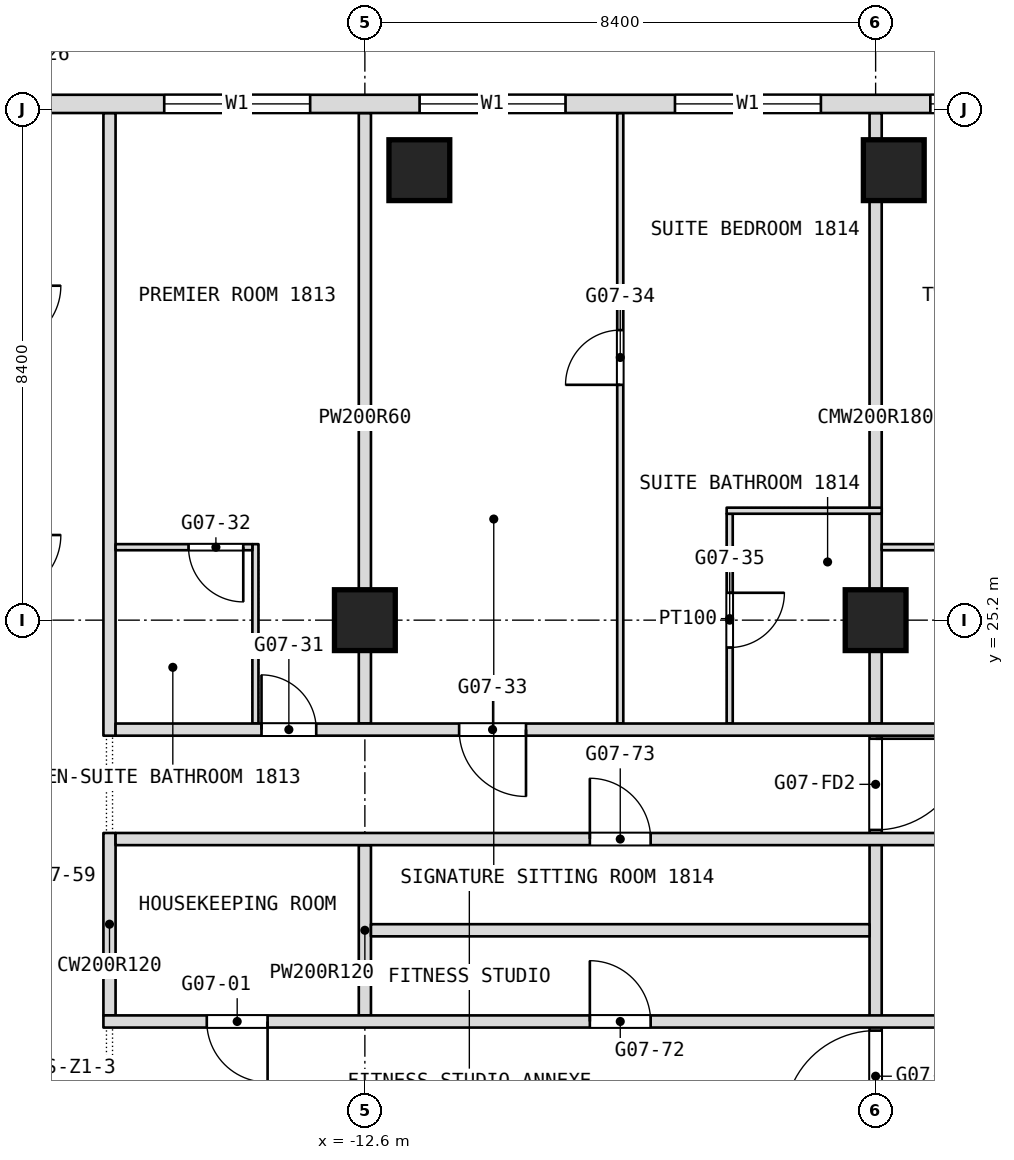
"""IFC4 building model, lengths in metres.
Left out: names, types, materials, properties, quantities, classifications, styles, units other than length and angle.
Written with IfcOpenShell. Run it as: python <this file> out.ifc"""

import sys

from ifc_helpers import new_model, si_unit, direction, frame, frame_2d, origin, origin_2d, place, context, subcontext, project, spatial, rectangle, extrude, element, fill, save


model = new_model("IFC4")
c1 = context("Model", 3, precision=1e-05, world=origin(), true_north=direction((0.0, 1.0)))
c2 = subcontext(c1, "Body", "Model", "MODEL_VIEW")
j1 = project(units=[si_unit("LENGTHUNIT", "METRE"), si_unit("PLANEANGLEUNIT", "RADIAN")], contexts=[c1])
p1 = place(None, origin())
s1 = spatial("IfcSite", under=j1, at=p1, CompositionType="ELEMENT")
p2 = place(p1, origin())
s2 = spatial("IfcBuilding", under=s1, at=p2, CompositionType="ELEMENT")
p3 = place(p2, frame((0.0, 0.0, 79.7)))
s3 = spatial("IfcBuildingStorey", under=s2, at=p3, CompositionType="ELEMENT", Elevation=79.7)
for number, where, z_axis, x_axis in (
    (1, (-12.6, 25.2, 0.0), (0.0, 0.0, 1.0), (1.0, 0.0, 0.0)),
    (2, (-4.2, 25.2, 0.0), (0.0, 0.0, 1.0), (1.0, 0.0, 0.0)),
    (3, (-11.704, 32.6, 0.0), (0.0, 0.0, 1.0), (1.0, 0.0, 0.0)),
    (4, (-3.901, 32.6, 0.0), (0.0, 0.0, 1.0), (1.0, 0.0, 0.0)),
):
    element("IfcColumn", number, at=place(p3, frame(where, z_axis=z_axis, x_axis=x_axis)), inside=s3, PredefinedType="COLUMN", context=c2, shape_type="SweptSolid", body=[
        extrude(rectangle(XDim=1.0, YDim=1.0, at=origin_2d()), origin(), (0.0, 0.0, 1.0), 3.6),
    ])
p4 = place(p3, frame((-4.2, 16.8, 0.0), z_axis=(0.0, 0.0, 1.0), x_axis=(0.0, 1.0, 0.0)))
e5 = element("IfcWall", 5, at=p4, inside=s3, PredefinedType="PARTITIONING", context=c2, shape_type="SweptSolid", body=[
    extrude(rectangle(XDim=6.7, YDim=0.2, at=frame_2d((3.35, 0.0))), origin(), (0.0, 0.0, 1.0), 3.34),
])
p5 = place(p4, frame((0.15, 0.0, 0.0)))
e6 = element("IfcOpeningElement", 6, at=p5, cuts=e5, PredefinedType="OPENING", context=c2, shape_type="SweptSolid", body=[
    extrude(rectangle(XDim=1.5, YDim=2.1, at=frame_2d((0.75, 1.05))), frame((0.0, 0.1, 0.0), z_axis=(0.0, -1.0, 0.0), x_axis=(1.0, 0.0, 0.0)), (0.0, 0.0, 1.0), 0.2),
])
p6 = place(p4, frame((4.95, 0.0, 0.0)))
e7 = element("IfcOpeningElement", 7, at=p6, cuts=e5, PredefinedType="OPENING", context=c2, shape_type="SweptSolid", body=[
    extrude(rectangle(XDim=1.5, YDim=2.1, at=frame_2d((0.75, 1.05))), frame((0.0, 0.1, 0.0), z_axis=(0.0, -1.0, 0.0), x_axis=(1.0, 0.0, 0.0)), (0.0, 0.0, 1.0), 0.2),
])
p7 = place(p3, frame((-4.2, 23.5, 0.0), z_axis=(0.0, 0.0, 1.0), x_axis=(0.0, 1.0, 0.0)))
e8 = element("IfcWall", 8, at=p7, inside=s3, PredefinedType="PARTITIONING", context=c2, shape_type="SweptSolid", body=[
    extrude(rectangle(XDim=10.04, YDim=0.2, at=frame_2d((5.02, 0.0))), origin(), (0.0, 0.0, 1.0), 3.34),
])
p8 = place(p3, frame((-6.6, 23.5, 0.0), z_axis=(0.0, 0.0, 1.0), x_axis=(0.0, 1.0, 0.0)))
e9 = element("IfcWall", 9, at=p8, inside=s3, PredefinedType="PARTITIONING", context=c2, shape_type="SweptSolid", body=[
    extrude(rectangle(XDim=3.45, YDim=0.1, at=frame_2d((1.725, 0.0))), origin(), (0.0, 0.0, 1.0), 3.34),
])
p9 = place(p8, frame((1.25, 0.0, 0.0)))
e10 = element("IfcOpeningElement", 10, at=p9, cuts=e9, PredefinedType="OPENING", context=c2, shape_type="SweptSolid", body=[
    extrude(rectangle(XDim=0.9, YDim=2.1, at=frame_2d((0.45, 1.05))), frame((0.0, 0.05, 0.0), z_axis=(0.0, -1.0, 0.0), x_axis=(1.0, 0.0, 0.0)), (0.0, 0.0, 1.0), 0.1),
])
p10 = place(p3, frame((-8.4, 23.5, 0.0), z_axis=(0.0, 0.0, 1.0), x_axis=(0.0, 1.0, 0.0)))
e11 = element("IfcWall", 11, at=p10, inside=s3, PredefinedType="PARTITIONING", context=c2, shape_type="SweptSolid", body=[
    extrude(rectangle(XDim=10.04, YDim=0.1, at=frame_2d((5.02, 0.0))), origin(), (0.0, 0.0, 1.0), 3.34),
])
p11 = place(p10, frame((5.57, 0.0, 0.0)))
e12 = element("IfcOpeningElement", 12, at=p11, cuts=e11, PredefinedType="OPENING", context=c2, shape_type="SweptSolid", body=[
    extrude(rectangle(XDim=0.9, YDim=2.1, at=frame_2d((0.45, 1.05))), frame((0.0, 0.05, 0.0), z_axis=(0.0, -1.0, 0.0), x_axis=(1.0, 0.0, 0.0)), (0.0, 0.0, 1.0), 0.1),
])
p12 = place(p3, frame((-12.6, 18.7, 0.0), z_axis=(0.0, 0.0, 1.0), x_axis=(0.0, 1.0, 0.0)))
e13 = element("IfcWall", 13, at=p12, inside=s3, PredefinedType="PARTITIONING", context=c2, shape_type="SweptSolid", body=[
    extrude(rectangle(XDim=2.8, YDim=0.2, at=frame_2d((1.4, 0.0))), origin(), (0.0, 0.0, 1.0), 3.34),
])
p13 = place(p3, frame((-12.6, 23.5, 0.0), z_axis=(0.0, 0.0, 1.0), x_axis=(0.0, 1.0, 0.0)))
e14 = element("IfcWall", 14, at=p13, inside=s3, PredefinedType="PARTITIONING", context=c2, shape_type="SweptSolid", body=[
    extrude(rectangle(XDim=10.04, YDim=0.2, at=frame_2d((5.02, 0.0))), origin(), (0.0, 0.0, 1.0), 3.34),
])
p14 = place(p3, frame((-14.4, 23.5, 0.0), z_axis=(0.0, 0.0, 1.0), x_axis=(0.0, 1.0, 0.0)))
e15 = element("IfcWall", 15, at=p14, inside=s3, PredefinedType="PARTITIONING", context=c2, shape_type="SweptSolid", body=[
    extrude(rectangle(XDim=2.95, YDim=0.1, at=frame_2d((1.475, 0.0))), origin(), (0.0, 0.0, 1.0), 3.34),
])
p15 = place(p3, frame((-16.8, 18.7, 0.0), z_axis=(0.0, 0.0, 1.0), x_axis=(0.0, 1.0, 0.0)))
e16 = element("IfcWall", 16, at=p15, inside=s3, PredefinedType="PARTITIONING", context=c2, shape_type="SweptSolid", body=[
    extrude(rectangle(XDim=3.0, YDim=0.2, at=frame_2d((1.5, 0.0))), origin(), (0.0, 0.0, 1.0), 3.34),
])
p16 = place(p3, frame((-16.8, 23.3, 0.0), z_axis=(0.0, 0.0, 1.0), x_axis=(0.0, 1.0, 0.0)))
e17 = element("IfcWall", 17, at=p16, inside=s3, PredefinedType="PARTITIONING", context=c2, shape_type="SweptSolid", body=[
    extrude(rectangle(XDim=10.24, YDim=0.2, at=frame_2d((5.12, 0.0))), origin(), (0.0, 0.0, 1.0), 3.34),
])
p17 = place(p3, frame((-16.9, 18.6, 0.0), z_axis=(0.0, 0.0, 1.0), x_axis=(1.0, 0.0, 0.0)))
e18 = element("IfcWall", 18, at=p17, inside=s3, PredefinedType="PARTITIONING", context=c2, shape_type="SweptSolid", body=[
    extrude(rectangle(XDim=25.1, YDim=0.2, at=frame_2d((12.55, 0.0))), origin(), (0.0, 0.0, 1.0), 3.34),
])
p18 = place(p17, frame((1.7, 0.0, 0.0)))
e19 = element("IfcOpeningElement", 19, at=p18, cuts=e18, PredefinedType="OPENING", context=c2, shape_type="SweptSolid", body=[
    extrude(rectangle(XDim=1.0, YDim=2.1, at=frame_2d((0.5, 1.05))), frame((0.0, 0.1, 0.0), z_axis=(0.0, -1.0, 0.0), x_axis=(1.0, 0.0, 0.0)), (0.0, 0.0, 1.0), 0.2),
])
p19 = place(p17, frame((16.4, 0.0, 0.0)))
e20 = element("IfcOpeningElement", 20, at=p19, cuts=e18, PredefinedType="OPENING", context=c2, shape_type="SweptSolid", body=[
    extrude(rectangle(XDim=1.0, YDim=2.1, at=frame_2d((0.5, 1.05))), frame((0.0, 0.1, 0.0), z_axis=(0.0, -1.0, 0.0), x_axis=(1.0, 0.0, 0.0)), (0.0, 0.0, 1.0), 0.2),
])
p20 = place(p17, frame((8.0, 0.0, 0.0)))
e21 = element("IfcOpeningElement", 21, at=p20, cuts=e18, PredefinedType="OPENING", context=c2, shape_type="SweptSolid", body=[
    extrude(rectangle(XDim=1.0, YDim=2.1, at=frame_2d((0.5, 1.05))), frame((0.0, 0.1, 0.0), z_axis=(0.0, -1.0, 0.0), x_axis=(1.0, 0.0, 0.0)), (0.0, 0.0, 1.0), 0.2),
])
p21 = place(p17, frame((22.55, 0.0, 0.0)))
e22 = element("IfcOpeningElement", 22, at=p21, cuts=e18, PredefinedType="OPENING", context=c2, shape_type="SweptSolid", body=[
    extrude(rectangle(XDim=1.0, YDim=2.1, at=frame_2d((0.5, 1.05))), frame((0.0, 0.1, 0.0), z_axis=(0.0, -1.0, 0.0), x_axis=(1.0, 0.0, 0.0)), (0.0, 0.0, 1.0), 0.2),
])
p22 = place(p3, frame((-12.5, 20.1, 0.0), z_axis=(0.0, 0.0, 1.0), x_axis=(1.0, 0.0, 0.0)))
e23 = element("IfcWall", 23, at=p22, inside=s3, PredefinedType="PARTITIONING", context=c2, shape_type="SweptSolid", body=[
    extrude(rectangle(XDim=8.2, YDim=0.2, at=frame_2d((4.1, 0.0))), origin(), (0.0, 0.0, 1.0), 3.34),
])
p23 = place(p3, frame((-16.7, 21.6, 0.0), z_axis=(0.0, 0.0, 1.0), x_axis=(1.0, 0.0, 0.0)))
e24 = element("IfcWall", 24, at=p23, inside=s3, PredefinedType="PARTITIONING", context=c2, shape_type="SweptSolid", body=[
    extrude(rectangle(XDim=24.7, YDim=0.2, at=frame_2d((12.35, 0.0))), origin(), (0.0, 0.0, 1.0), 3.34),
])
p24 = place(p23, frame((7.8, 0.0, 0.0)))
e25 = element("IfcOpeningElement", 25, at=p24, cuts=e24, PredefinedType="OPENING", context=c2, shape_type="SweptSolid", body=[
    extrude(rectangle(XDim=1.0, YDim=2.1, at=frame_2d((0.5, 1.05))), frame((0.0, 0.1, 0.0), z_axis=(0.0, -1.0, 0.0), x_axis=(1.0, 0.0, 0.0)), (0.0, 0.0, 1.0), 0.2),
])
p25 = place(p23, frame((22.25, 0.0, 0.0)))
e26 = element("IfcOpeningElement", 26, at=p25, cuts=e24, PredefinedType="OPENING", context=c2, shape_type="SweptSolid", body=[
    extrude(rectangle(XDim=1.0, YDim=2.1, at=frame_2d((0.5, 1.05))), frame((0.0, 0.1, 0.0), z_axis=(0.0, -1.0, 0.0), x_axis=(1.0, 0.0, 0.0)), (0.0, 0.0, 1.0), 0.2),
])
p26 = place(p3, frame((-16.7, 23.4, 0.0), z_axis=(0.0, 0.0, 1.0), x_axis=(1.0, 0.0, 0.0)))
e27 = element("IfcWall", 27, at=p26, inside=s3, PredefinedType="PARTITIONING", context=c2, shape_type="SweptSolid", body=[
    extrude(rectangle(XDim=23.4, YDim=0.2, at=frame_2d((11.7, 0.0))), origin(), (0.0, 0.0, 1.0), 3.34),
])
p27 = place(p26, frame((2.4, 0.0, 0.0)))
e28 = element("IfcOpeningElement", 28, at=p27, cuts=e27, PredefinedType="OPENING", context=c2, shape_type="SweptSolid", body=[
    extrude(rectangle(XDim=0.9, YDim=2.1, at=frame_2d((0.45, 1.05))), frame((0.0, 0.1, 0.0), z_axis=(0.0, -1.0, 0.0), x_axis=(1.0, 0.0, 0.0)), (0.0, 0.0, 1.0), 0.2),
])
p28 = place(p26, frame((5.65, 0.0, 0.0)))
e29 = element("IfcOpeningElement", 29, at=p28, cuts=e27, PredefinedType="OPENING", context=c2, shape_type="SweptSolid", body=[
    extrude(rectangle(XDim=1.1, YDim=2.1, at=frame_2d((0.55, 1.05))), frame((0.0, 0.1, 0.0), z_axis=(0.0, -1.0, 0.0), x_axis=(1.0, 0.0, 0.0)), (0.0, 0.0, 1.0), 0.2),
])
p29 = place(p26, frame((15.3, 0.0, 0.0)))
e30 = element("IfcOpeningElement", 30, at=p29, cuts=e27, PredefinedType="OPENING", context=c2, shape_type="SweptSolid", body=[
    extrude(rectangle(XDim=1.0, YDim=2.1, at=frame_2d((0.5, 1.05))), frame((0.0, 0.1, 0.0), z_axis=(0.0, -1.0, 0.0), x_axis=(1.0, 0.0, 0.0)), (0.0, 0.0, 1.0), 0.2),
])
p30 = place(p26, frame((17.1, 0.0, 0.0)))
e31 = element("IfcOpeningElement", 31, at=p30, cuts=e27, PredefinedType="OPENING", context=c2, shape_type="SweptSolid", body=[
    extrude(rectangle(XDim=1.0, YDim=2.1, at=frame_2d((0.5, 1.05))), frame((0.0, 0.1, 0.0), z_axis=(0.0, -1.0, 0.0), x_axis=(1.0, 0.0, 0.0)), (0.0, 0.0, 1.0), 0.2),
])
p31 = place(p3, frame((-16.7, 26.4, 0.0), z_axis=(0.0, 0.0, 1.0), x_axis=(1.0, 0.0, 0.0)))
e32 = element("IfcWall", 32, at=p31, inside=s3, PredefinedType="PARTITIONING", context=c2, shape_type="SweptSolid", body=[
    extrude(rectangle(XDim=2.25, YDim=0.1, at=frame_2d((1.125, 0.0))), origin(), (0.0, 0.0, 1.0), 3.34),
])
p32 = place(p31, frame((1.2, 0.0, 0.0)))
e33 = element("IfcOpeningElement", 33, at=p32, cuts=e32, PredefinedType="OPENING", context=c2, shape_type="SweptSolid", body=[
    extrude(rectangle(XDim=0.9, YDim=2.1, at=frame_2d((0.45, 1.05))), frame((0.0, 0.05, 0.0), z_axis=(0.0, -1.0, 0.0), x_axis=(1.0, 0.0, 0.0)), (0.0, 0.0, 1.0), 0.1),
])
p33 = place(p3, frame((-4.1, 26.4, 0.0), z_axis=(0.0, 0.0, 1.0), x_axis=(1.0, 0.0, 0.0)))
e34 = element("IfcWall", 34, at=p33, inside=s3, PredefinedType="PARTITIONING", context=c2, shape_type="SweptSolid", body=[
    extrude(rectangle(XDim=2.25, YDim=0.1, at=frame_2d((1.125, 0.0))), origin(), (0.0, 0.0, 1.0), 3.34),
])
p34 = place(p33, frame((1.2, 0.0, 0.0)))
e35 = element("IfcOpeningElement", 35, at=p34, cuts=e34, PredefinedType="OPENING", context=c2, shape_type="SweptSolid", body=[
    extrude(rectangle(XDim=0.9, YDim=2.1, at=frame_2d((0.45, 1.05))), frame((0.0, 0.05, 0.0), z_axis=(0.0, -1.0, 0.0), x_axis=(1.0, 0.0, 0.0)), (0.0, 0.0, 1.0), 0.1),
])
p35 = place(p3, frame((-6.65, 27.0, 0.0), z_axis=(0.0, 0.0, 1.0), x_axis=(1.0, 0.0, 0.0)))
e36 = element("IfcWall", 36, at=p35, inside=s3, PredefinedType="PARTITIONING", context=c2, shape_type="SweptSolid", body=[
    extrude(rectangle(XDim=2.55, YDim=0.1, at=frame_2d((1.275, 0.0))), origin(), (0.0, 0.0, 1.0), 3.34),
])
p36 = place(p3, frame((23.406, 33.69, 0.0), z_axis=(0.0, 0.0, 1.0), x_axis=(-1.0, 0.0, 0.0)))
e37 = element("IfcWall", 37, at=p36, inside=s3, PredefinedType="NOTDEFINED", context=c2, shape_type="SweptSolid", body=[
    extrude(rectangle(XDim=46.812, YDim=0.3, at=frame_2d((23.406, 0.0))), origin(), (0.0, 0.0, 1.0), 3.6),
])
p37 = place(p36, frame((2.186, 0.0, 0.9)))
e38 = element("IfcOpeningElement", 38, at=p37, cuts=e37, PredefinedType="OPENING", context=c2, shape_type="SweptSolid", body=[
    extrude(rectangle(XDim=2.4, YDim=2.1, at=frame_2d((1.2, 1.05))), frame((0.0, 0.15, 0.0), z_axis=(0.0, -1.0, 0.0), x_axis=(1.0, 0.0, 0.0)), (0.0, 0.0, 1.0), 0.3),
])
p38 = place(p36, frame((7.506, 0.0, 0.9)))
e39 = element("IfcOpeningElement", 39, at=p38, cuts=e37, PredefinedType="OPENING", context=c2, shape_type="SweptSolid", body=[
    extrude(rectangle(XDim=2.4, YDim=2.1, at=frame_2d((1.2, 1.05))), frame((0.0, 0.15, 0.0), z_axis=(0.0, -1.0, 0.0), x_axis=(1.0, 0.0, 0.0)), (0.0, 0.0, 1.0), 0.3),
])
p39 = place(p36, frame((11.706, 0.0, 0.9)))
e40 = element("IfcOpeningElement", 40, at=p39, cuts=e37, PredefinedType="OPENING", context=c2, shape_type="SweptSolid", body=[
    extrude(rectangle(XDim=2.4, YDim=2.1, at=frame_2d((1.2, 1.05))), frame((0.0, 0.15, 0.0), z_axis=(0.0, -1.0, 0.0), x_axis=(1.0, 0.0, 0.0)), (0.0, 0.0, 1.0), 0.3),
])
p40 = place(p36, frame((15.906, 0.0, 0.9)))
e41 = element("IfcOpeningElement", 41, at=p40, cuts=e37, PredefinedType="OPENING", context=c2, shape_type="SweptSolid", body=[
    extrude(rectangle(XDim=2.4, YDim=2.1, at=frame_2d((1.2, 1.05))), frame((0.0, 0.15, 0.0), z_axis=(0.0, -1.0, 0.0), x_axis=(1.0, 0.0, 0.0)), (0.0, 0.0, 1.0), 0.3),
])
p41 = place(p36, frame((20.106, 0.0, 0.9)))
e42 = element("IfcOpeningElement", 42, at=p41, cuts=e37, PredefinedType="OPENING", context=c2, shape_type="SweptSolid", body=[
    extrude(rectangle(XDim=2.4, YDim=2.1, at=frame_2d((1.2, 1.05))), frame((0.0, 0.15, 0.0), z_axis=(0.0, -1.0, 0.0), x_axis=(1.0, 0.0, 0.0)), (0.0, 0.0, 1.0), 0.3),
])
p42 = place(p36, frame((24.306, 0.0, 0.9)))
e43 = element("IfcOpeningElement", 43, at=p42, cuts=e37, PredefinedType="OPENING", context=c2, shape_type="SweptSolid", body=[
    extrude(rectangle(XDim=2.4, YDim=2.1, at=frame_2d((1.2, 1.05))), frame((0.0, 0.15, 0.0), z_axis=(0.0, -1.0, 0.0), x_axis=(1.0, 0.0, 0.0)), (0.0, 0.0, 1.0), 0.3),
])
p43 = place(p36, frame((28.506, 0.0, 0.9)))
e44 = element("IfcOpeningElement", 44, at=p43, cuts=e37, PredefinedType="OPENING", context=c2, shape_type="SweptSolid", body=[
    extrude(rectangle(XDim=2.4, YDim=2.1, at=frame_2d((1.2, 1.05))), frame((0.0, 0.15, 0.0), z_axis=(0.0, -1.0, 0.0), x_axis=(1.0, 0.0, 0.0)), (0.0, 0.0, 1.0), 0.3),
])
p44 = place(p36, frame((32.706, 0.0, 0.9)))
e45 = element("IfcOpeningElement", 45, at=p44, cuts=e37, PredefinedType="OPENING", context=c2, shape_type="SweptSolid", body=[
    extrude(rectangle(XDim=2.4, YDim=2.1, at=frame_2d((1.2, 1.05))), frame((0.0, 0.15, 0.0), z_axis=(0.0, -1.0, 0.0), x_axis=(1.0, 0.0, 0.0)), (0.0, 0.0, 1.0), 0.3),
])
p45 = place(p36, frame((36.906, 0.0, 0.9)))
e46 = element("IfcOpeningElement", 46, at=p45, cuts=e37, PredefinedType="OPENING", context=c2, shape_type="SweptSolid", body=[
    extrude(rectangle(XDim=2.4, YDim=2.1, at=frame_2d((1.2, 1.05))), frame((0.0, 0.15, 0.0), z_axis=(0.0, -1.0, 0.0), x_axis=(1.0, 0.0, 0.0)), (0.0, 0.0, 1.0), 0.3),
])
p46 = place(p36, frame((42.226, 0.0, 0.9)))
e47 = element("IfcOpeningElement", 47, at=p46, cuts=e37, PredefinedType="OPENING", context=c2, shape_type="SweptSolid", body=[
    extrude(rectangle(XDim=2.4, YDim=2.1, at=frame_2d((1.2, 1.05))), frame((0.0, 0.15, 0.0), z_axis=(0.0, -1.0, 0.0), x_axis=(1.0, 0.0, 0.0)), (0.0, 0.0, 1.0), 0.3),
])
p47 = place(p9, origin())
e48 = element("IfcDoor", 48, at=p47, inside=s3, OperationType="SINGLE_SWING_RIGHT", PredefinedType="DOOR", context=c2, shape_type="SweptSolid", body=[
    extrude(rectangle(XDim=0.9, YDim=2.1, at=frame_2d((0.45, 1.05))), frame((0.0, 0.025, 0.0), z_axis=(0.0, -1.0, 0.0), x_axis=(1.0, 0.0, 0.0)), (0.0, 0.0, 1.0), 0.05),
])
fill(e10, e48)
p48 = place(p11, origin())
e49 = element("IfcDoor", 49, at=p48, inside=s3, OperationType="SINGLE_SWING_RIGHT", PredefinedType="DOOR", context=c2, shape_type="SweptSolid", body=[
    extrude(rectangle(XDim=0.9, YDim=2.1, at=frame_2d((0.45, 1.05))), frame((0.0, 0.025, 0.0), z_axis=(0.0, -1.0, 0.0), x_axis=(1.0, 0.0, 0.0)), (0.0, 0.0, 1.0), 0.05),
])
fill(e12, e49)
p49 = place(p18, origin())
e50 = element("IfcDoor", 50, at=p49, inside=s3, OperationType="SINGLE_SWING_RIGHT", PredefinedType="DOOR", context=c2, shape_type="SweptSolid", body=[
    extrude(rectangle(XDim=1.0, YDim=2.1, at=frame_2d((0.5, 1.05))), frame((0.0, 0.025, 0.0), z_axis=(0.0, -1.0, 0.0), x_axis=(1.0, 0.0, 0.0)), (0.0, 0.0, 1.0), 0.05),
])
fill(e19, e50)
p50 = place(p20, origin())
e51 = element("IfcDoor", 51, at=p50, inside=s3, OperationType="SINGLE_SWING_RIGHT", PredefinedType="DOOR", context=c2, shape_type="SweptSolid", body=[
    extrude(rectangle(XDim=1.0, YDim=2.1, at=frame_2d((0.5, 1.05))), frame((0.0, 0.025, 0.0), z_axis=(0.0, -1.0, 0.0), x_axis=(1.0, 0.0, 0.0)), (0.0, 0.0, 1.0), 0.05),
])
fill(e21, e51)
p51 = place(p24, origin())
e52 = element("IfcDoor", 52, at=p51, inside=s3, OperationType="SINGLE_SWING_RIGHT", PredefinedType="DOOR", context=c2, shape_type="SweptSolid", body=[
    extrude(rectangle(XDim=1.0, YDim=2.1, at=frame_2d((0.5, 1.05))), frame((0.0, 0.025, 0.0), z_axis=(0.0, -1.0, 0.0), x_axis=(1.0, 0.0, 0.0)), (0.0, 0.0, 1.0), 0.05),
])
fill(e25, e52)
p52 = place(p27, origin())
e53 = element("IfcDoor", 53, at=p52, inside=s3, OperationType="SINGLE_SWING_LEFT", PredefinedType="DOOR", context=c2, shape_type="SweptSolid", body=[
    extrude(rectangle(XDim=0.9, YDim=2.1, at=frame_2d((0.45, 1.05))), frame((0.0, 0.025, 0.0), z_axis=(0.0, -1.0, 0.0), x_axis=(1.0, 0.0, 0.0)), (0.0, 0.0, 1.0), 0.05),
])
fill(e28, e53)
p53 = place(p28, origin())
e54 = element("IfcDoor", 54, at=p53, inside=s3, OperationType="SINGLE_SWING_RIGHT", PredefinedType="DOOR", context=c2, shape_type="SweptSolid", body=[
    extrude(rectangle(XDim=1.1, YDim=2.1, at=frame_2d((0.55, 1.05))), frame((0.0, 0.025, 0.0), z_axis=(0.0, -1.0, 0.0), x_axis=(1.0, 0.0, 0.0)), (0.0, 0.0, 1.0), 0.05),
])
fill(e29, e54)
p54 = place(p32, origin())
e55 = element("IfcDoor", 55, at=p54, inside=s3, OperationType="SINGLE_SWING_LEFT", PredefinedType="DOOR", context=c2, shape_type="SweptSolid", body=[
    extrude(rectangle(XDim=0.9, YDim=2.1, at=frame_2d((0.45, 1.05))), frame((0.0, 0.025, 0.0), z_axis=(0.0, -1.0, 0.0), x_axis=(1.0, 0.0, 0.0)), (0.0, 0.0, 1.0), 0.05),
])
fill(e33, e55)
p55 = place(p42, origin())
e56 = element("IfcWindow", 56, at=p55, inside=s3, PartitioningType="SINGLE_PANEL", PredefinedType="WINDOW", context=c2, shape_type="SweptSolid", body=[
    extrude(rectangle(XDim=2.4, YDim=2.1, at=frame_2d((1.2, 1.05))), frame((0.0, 0.03, 0.0), z_axis=(0.0, -1.0, 0.0), x_axis=(1.0, 0.0, 0.0)), (0.0, 0.0, 1.0), 0.06),
])
fill(e43, e56)
p56 = place(p43, origin())
e57 = element("IfcWindow", 57, at=p56, inside=s3, PartitioningType="SINGLE_PANEL", PredefinedType="WINDOW", context=c2, shape_type="SweptSolid", body=[
    extrude(rectangle(XDim=2.4, YDim=2.1, at=frame_2d((1.2, 1.05))), frame((0.0, 0.03, 0.0), z_axis=(0.0, -1.0, 0.0), x_axis=(1.0, 0.0, 0.0)), (0.0, 0.0, 1.0), 0.06),
])
fill(e44, e57)
p57 = place(p44, origin())
e58 = element("IfcWindow", 58, at=p57, inside=s3, PartitioningType="SINGLE_PANEL", PredefinedType="WINDOW", context=c2, shape_type="SweptSolid", body=[
    extrude(rectangle(XDim=2.4, YDim=2.1, at=frame_2d((1.2, 1.05))), frame((0.0, 0.03, 0.0), z_axis=(0.0, -1.0, 0.0), x_axis=(1.0, 0.0, 0.0)), (0.0, 0.0, 1.0), 0.06),
])
fill(e45, e58)
p58 = place(p45, origin())
e59 = element("IfcWindow", 59, at=p58, inside=s3, PartitioningType="SINGLE_PANEL", PredefinedType="WINDOW", context=c2, shape_type="SweptSolid", body=[
    extrude(rectangle(XDim=2.4, YDim=2.1, at=frame_2d((1.2, 1.05))), frame((0.0, 0.03, 0.0), z_axis=(0.0, -1.0, 0.0), x_axis=(1.0, 0.0, 0.0)), (0.0, 0.0, 1.0), 0.06),
])
fill(e46, e59)
p59 = place(p5, origin())
e60 = element("IfcDoor", 60, at=p59, inside=s3, OperationType="DOUBLE_DOOR_DOUBLE_SWING", PredefinedType="DOOR", context=c2, shape_type="SweptSolid", body=[
    extrude(rectangle(XDim=1.5, YDim=2.1, at=frame_2d((0.75, 1.05))), frame((0.0, 0.025, 0.0), z_axis=(0.0, -1.0, 0.0), x_axis=(1.0, 0.0, 0.0)), (0.0, 0.0, 1.0), 0.05),
])
fill(e6, e60)
p60 = place(p6, origin())
e61 = element("IfcDoor", 61, at=p60, inside=s3, OperationType="DOUBLE_DOOR_DOUBLE_SWING", PredefinedType="DOOR", context=c2, shape_type="SweptSolid", body=[
    extrude(rectangle(XDim=1.5, YDim=2.1, at=frame_2d((0.75, 1.05))), frame((0.0, 0.025, 0.0), z_axis=(0.0, -1.0, 0.0), x_axis=(1.0, 0.0, 0.0)), (0.0, 0.0, 1.0), 0.05),
])
fill(e7, e61)
save(model, sys.argv[1])
